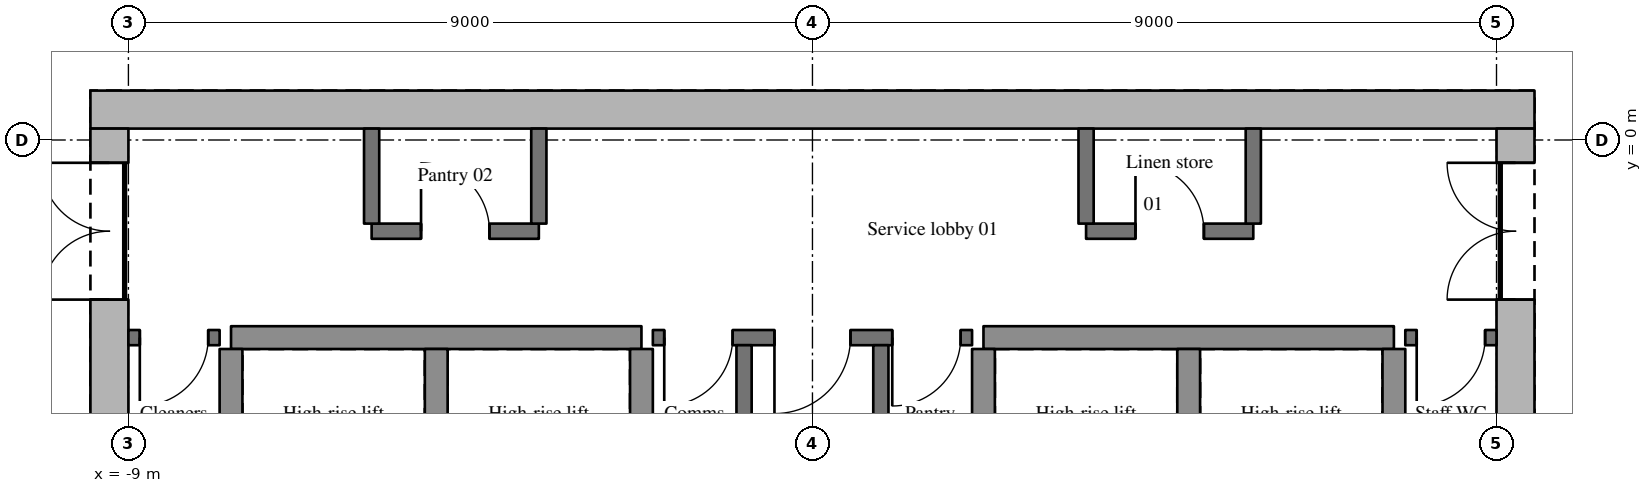
"""IFC4 building model, lengths in metres.
Left out: names, types, materials, properties, quantities, classifications, styles, units other than length and angle.
Written with IfcOpenShell. Run it as: python <this file> out.ifc"""

import sys

from ifc_helpers import new_model, si_unit, direction, frame, frame_2d, origin, place, context, subcontext, project, spatial, polyline, rectangle, outline, extrude, element, fill, save


model = new_model("IFC4")
c1 = context("Model", 3, precision=1e-05, world=origin(), true_north=direction((0.0, 1.0)))
c2 = subcontext(c1, "Body", "Model", "MODEL_VIEW")
j1 = project(units=[si_unit("LENGTHUNIT", "METRE"), si_unit("PLANEANGLEUNIT", "RADIAN")], contexts=[c1])
p1 = place(None, origin())
s1 = spatial("IfcSite", under=j1, at=p1, CompositionType="ELEMENT")
p2 = place(p1, origin())
s2 = spatial("IfcBuilding", under=s1, at=p2, CompositionType="ELEMENT")
p3 = place(p2, frame((0.0, 0.0, 297.3)))
s3 = spatial("IfcBuildingStorey", under=s2, at=p3, CompositionType="ELEMENT", Elevation=297.3)
p4 = place(p3, frame((-9.5, 0.4, 0.0), z_axis=(0.0, 0.0, 1.0), x_axis=(1.0, 0.0, 0.0)))
e1 = element("IfcWall", 1, at=p4, inside=s3, PredefinedType="SHEAR", context=c2, shape_type="SweptSolid", body=[
    extrude(outline(polyline([(0.0, 0.0), (19.0, 0.0), (19.0, 3.6), (0.0, 3.6), (0.0, 0.0)])), frame((0.0, 0.25, 0.0), z_axis=(0.0, -1.0, 0.0), x_axis=(1.0, 0.0, 0.0)), (0.0, 0.0, 1.0), 0.5),
])
p5 = place(p3, frame((-9.25, -11.5, 0.0), z_axis=(0.0, 0.0, 1.0), x_axis=(0.0, 1.0, 0.0)))
e2 = element("IfcWall", 2, at=p5, inside=s3, PredefinedType="SHEAR", context=c2, shape_type="SweptSolid", body=[
    extrude(outline(polyline([(0.0, 0.0), (11.65, 0.0), (11.65, 3.6), (0.0, 3.6), (0.0, 0.0)])), frame((0.0, 0.25, 0.0), z_axis=(0.0, -1.0, 0.0), x_axis=(1.0, 0.0, 0.0)), (0.0, 0.0, 1.0), 0.5),
])
p6 = place(p5, frame((9.4, 0.0, 0.0)))
e3 = element("IfcOpeningElement", 3, at=p6, cuts=e2, PredefinedType="OPENING", context=c2, shape_type="SweptSolid", body=[
    extrude(rectangle(XDim=1.8, YDim=2.1, at=frame_2d((0.9, 1.05))), frame((0.0, 0.26, 0.0), z_axis=(0.0, -1.0, 0.0), x_axis=(1.0, 0.0, 0.0)), (0.0, 0.0, 1.0), 0.52),
])
p7 = place(p3, frame((9.25, -11.5, 0.0), z_axis=(0.0, 0.0, 1.0), x_axis=(0.0, 1.0, 0.0)))
e4 = element("IfcWall", 4, at=p7, inside=s3, PredefinedType="SHEAR", context=c2, shape_type="SweptSolid", body=[
    extrude(outline(polyline([(0.0, 0.0), (11.65, 0.0), (11.65, 3.6), (0.0, 3.6), (0.0, 0.0)])), frame((0.0, 0.25, 0.0), z_axis=(0.0, -1.0, 0.0), x_axis=(1.0, 0.0, 0.0)), (0.0, 0.0, 1.0), 0.5),
])
p8 = place(p7, frame((9.4, 0.0, 0.0)))
e5 = element("IfcOpeningElement", 5, at=p8, cuts=e4, PredefinedType="OPENING", context=c2, shape_type="SweptSolid", body=[
    extrude(rectangle(XDim=1.8, YDim=2.1, at=frame_2d((0.9, 1.05))), frame((0.0, 0.26, 0.0), z_axis=(0.0, -1.0, 0.0), x_axis=(1.0, 0.0, 0.0)), (0.0, 0.0, 1.0), 0.52),
])
p9 = place(p3, frame((-7.8, -2.6, 0.0), z_axis=(0.0, 0.0, 1.0), x_axis=(-1.0, 0.0, 0.0)))
e6 = element("IfcWall", 6, at=p9, inside=s3, PredefinedType="SOLIDWALL", context=c2, shape_type="SweptSolid", body=[
    extrude(rectangle(XDim=1.2, YDim=0.2, at=frame_2d((0.6, 0.0))), origin(), (0.0, 0.0, 1.0), 3.3),
])
p10 = place(p9, frame((0.15, 0.0, 0.0)))
e7 = element("IfcOpeningElement", 7, at=p10, cuts=e6, PredefinedType="OPENING", context=c2, shape_type="SweptSolid", body=[
    extrude(rectangle(XDim=0.9, YDim=2.1, at=frame_2d((0.45, 1.05))), frame((0.0, 0.11, 0.0), z_axis=(0.0, -1.0, 0.0), x_axis=(1.0, 0.0, 0.0)), (0.0, 0.0, 1.0), 0.22),
])
p11 = place(p3, frame((-7.65, -2.6, 0.0), z_axis=(0.0, 0.0, 1.0), x_axis=(1.0, 0.0, 0.0)))
e8 = element("IfcWall", 8, at=p11, inside=s3, PredefinedType="SHEAR", context=c2, shape_type="SweptSolid", body=[
    extrude(rectangle(XDim=5.4, YDim=0.3, at=frame_2d((2.7, 0.0))), origin(), (0.0, 0.0, 1.0), 3.6),
])
p12 = place(p3, frame((2.1, -2.6, 0.0), z_axis=(0.0, 0.0, 1.0), x_axis=(-1.0, 0.0, 0.0)))
e9 = element("IfcWall", 9, at=p12, inside=s3, PredefinedType="SOLIDWALL", context=c2, shape_type="SweptSolid", body=[
    extrude(rectangle(XDim=4.2, YDim=0.2, at=frame_2d((2.1, 0.0))), origin(), (0.0, 0.0, 1.0), 3.3),
])
p13 = place(p12, frame((1.6, 0.0, 0.0)))
e10 = element("IfcOpeningElement", 10, at=p13, cuts=e9, PredefinedType="OPENING", context=c2, shape_type="SweptSolid", body=[
    extrude(rectangle(XDim=1.0, YDim=2.1, at=frame_2d((0.5, 1.05))), frame((0.0, 0.11, 0.0), z_axis=(0.0, -1.0, 0.0), x_axis=(1.0, 0.0, 0.0)), (0.0, 0.0, 1.0), 0.22),
])
p14 = place(p12, frame((3.15, 0.0, 0.0)))
e11 = element("IfcOpeningElement", 11, at=p14, cuts=e9, PredefinedType="OPENING", context=c2, shape_type="SweptSolid", body=[
    extrude(rectangle(XDim=0.9, YDim=2.1, at=frame_2d((0.45, 1.05))), frame((0.0, 0.11, 0.0), z_axis=(0.0, -1.0, 0.0), x_axis=(1.0, 0.0, 0.0)), (0.0, 0.0, 1.0), 0.22),
])
p15 = place(p12, frame((0.15, 0.0, 0.0)))
e12 = element("IfcOpeningElement", 12, at=p15, cuts=e9, PredefinedType="OPENING", context=c2, shape_type="SweptSolid", body=[
    extrude(rectangle(XDim=0.9, YDim=2.1, at=frame_2d((0.45, 1.05))), frame((0.0, 0.11, 0.0), z_axis=(0.0, -1.0, 0.0), x_axis=(1.0, 0.0, 0.0)), (0.0, 0.0, 1.0), 0.22),
])
p16 = place(p3, frame((2.25, -2.6, 0.0), z_axis=(0.0, 0.0, 1.0), x_axis=(1.0, 0.0, 0.0)))
e13 = element("IfcWall", 13, at=p16, inside=s3, PredefinedType="SHEAR", context=c2, shape_type="SweptSolid", body=[
    extrude(rectangle(XDim=5.4, YDim=0.3, at=frame_2d((2.7, 0.0))), origin(), (0.0, 0.0, 1.0), 3.6),
])
p17 = place(p3, frame((9.0, -2.6, 0.0), z_axis=(0.0, 0.0, 1.0), x_axis=(-1.0, 0.0, 0.0)))
e14 = element("IfcWall", 14, at=p17, inside=s3, PredefinedType="SOLIDWALL", context=c2, shape_type="SweptSolid", body=[
    extrude(rectangle(XDim=1.2, YDim=0.2, at=frame_2d((0.6, 0.0))), origin(), (0.0, 0.0, 1.0), 3.3),
])
p18 = place(p17, frame((0.15, 0.0, 0.0)))
e15 = element("IfcOpeningElement", 15, at=p18, cuts=e14, PredefinedType="OPENING", context=c2, shape_type="SweptSolid", body=[
    extrude(rectangle(XDim=0.9, YDim=2.1, at=frame_2d((0.45, 1.05))), frame((0.0, 0.11, 0.0), z_axis=(0.0, -1.0, 0.0), x_axis=(1.0, 0.0, 0.0)), (0.0, 0.0, 1.0), 0.22),
])
p19 = place(p3, frame((-5.8, -1.2, 0.0), z_axis=(0.0, 0.0, 1.0), x_axis=(1.0, 0.0, 0.0)))
e16 = element("IfcWall", 16, at=p19, inside=s3, PredefinedType="SOLIDWALL", context=c2, shape_type="SweptSolid", body=[
    extrude(rectangle(XDim=2.2, YDim=0.2, at=frame_2d((1.1, 0.0))), origin(), (0.0, 0.0, 1.0), 3.3),
])
p20 = place(p19, frame((0.65, 0.0, 0.0)))
e17 = element("IfcOpeningElement", 17, at=p20, cuts=e16, PredefinedType="OPENING", context=c2, shape_type="SweptSolid", body=[
    extrude(rectangle(XDim=0.9, YDim=2.1, at=frame_2d((0.45, 1.05))), frame((0.0, 0.11, 0.0), z_axis=(0.0, -1.0, 0.0), x_axis=(1.0, 0.0, 0.0)), (0.0, 0.0, 1.0), 0.22),
])
p21 = place(p3, frame((3.6, -1.2, 0.0), z_axis=(0.0, 0.0, 1.0), x_axis=(1.0, 0.0, 0.0)))
e18 = element("IfcWall", 18, at=p21, inside=s3, PredefinedType="SOLIDWALL", context=c2, shape_type="SweptSolid", body=[
    extrude(rectangle(XDim=2.2, YDim=0.2, at=frame_2d((1.1, 0.0))), origin(), (0.0, 0.0, 1.0), 3.3),
])
p22 = place(p21, frame((0.65, 0.0, 0.0)))
e19 = element("IfcOpeningElement", 19, at=p22, cuts=e18, PredefinedType="OPENING", context=c2, shape_type="SweptSolid", body=[
    extrude(rectangle(XDim=0.9, YDim=2.1, at=frame_2d((0.45, 1.05))), frame((0.0, 0.11, 0.0), z_axis=(0.0, -1.0, 0.0), x_axis=(1.0, 0.0, 0.0)), (0.0, 0.0, 1.0), 0.22),
])
p23 = place(p3, frame((-7.65, -4.8, 0.0), z_axis=(0.0, 0.0, 1.0), x_axis=(0.0, 1.0, 0.0)))
e20 = element("IfcWall", 20, at=p23, inside=s3, PredefinedType="SHEAR", context=c2, shape_type="SweptSolid", body=[
    extrude(rectangle(XDim=2.05, YDim=0.3, at=frame_2d((1.025, 0.0))), origin(), (0.0, 0.0, 1.0), 3.6),
])
p24 = place(p3, frame((-5.8, -1.1, 0.0), z_axis=(0.0, 0.0, 1.0), x_axis=(0.0, 1.0, 0.0)))
e21 = element("IfcWall", 21, at=p24, inside=s3, PredefinedType="SOLIDWALL", context=c2, shape_type="SweptSolid", body=[
    extrude(rectangle(XDim=1.25, YDim=0.2, at=frame_2d((0.625, 0.0))), origin(), (0.0, 0.0, 1.0), 3.3),
])
p25 = place(p3, frame((-4.95, -4.8, 0.0), z_axis=(0.0, 0.0, 1.0), x_axis=(0.0, 1.0, 0.0)))
e22 = element("IfcWall", 22, at=p25, inside=s3, PredefinedType="SHEAR", context=c2, shape_type="SweptSolid", body=[
    extrude(rectangle(XDim=2.05, YDim=0.3, at=frame_2d((1.025, 0.0))), origin(), (0.0, 0.0, 1.0), 3.6),
])
p26 = place(p3, frame((-3.6, -1.1, 0.0), z_axis=(0.0, 0.0, 1.0), x_axis=(0.0, 1.0, 0.0)))
e23 = element("IfcWall", 23, at=p26, inside=s3, PredefinedType="SOLIDWALL", context=c2, shape_type="SweptSolid", body=[
    extrude(rectangle(XDim=1.25, YDim=0.2, at=frame_2d((0.625, 0.0))), origin(), (0.0, 0.0, 1.0), 3.3),
])
p27 = place(p3, frame((-2.25, -4.8, 0.0), z_axis=(0.0, 0.0, 1.0), x_axis=(0.0, 1.0, 0.0)))
e24 = element("IfcWall", 24, at=p27, inside=s3, PredefinedType="SHEAR", context=c2, shape_type="SweptSolid", body=[
    extrude(rectangle(XDim=2.05, YDim=0.3, at=frame_2d((1.025, 0.0))), origin(), (0.0, 0.0, 1.0), 3.6),
])
for number, where, z_axis, x_axis in (
    (25, (-0.9, -4.85, 0.0), (0.0, 0.0, 1.0), (0.0, 1.0, 0.0)),
    (26, (0.9, -4.85, 0.0), (0.0, 0.0, 1.0), (0.0, 1.0, 0.0)),
):
    element("IfcWall", number, at=place(p3, frame(where, z_axis=z_axis, x_axis=x_axis)), inside=s3, PredefinedType="SOLIDWALL", context=c2, shape_type="SweptSolid", body=[
        extrude(rectangle(XDim=2.15, YDim=0.2, at=frame_2d((1.075, 0.0))), origin(), (0.0, 0.0, 1.0), 3.3),
    ])
p28 = place(p3, frame((2.25, -4.8, 0.0), z_axis=(0.0, 0.0, 1.0), x_axis=(0.0, 1.0, 0.0)))
e27 = element("IfcWall", 27, at=p28, inside=s3, PredefinedType="SHEAR", context=c2, shape_type="SweptSolid", body=[
    extrude(rectangle(XDim=2.05, YDim=0.3, at=frame_2d((1.025, 0.0))), origin(), (0.0, 0.0, 1.0), 3.6),
])
p29 = place(p3, frame((3.6, -1.1, 0.0), z_axis=(0.0, 0.0, 1.0), x_axis=(0.0, 1.0, 0.0)))
e28 = element("IfcWall", 28, at=p29, inside=s3, PredefinedType="SOLIDWALL", context=c2, shape_type="SweptSolid", body=[
    extrude(rectangle(XDim=1.25, YDim=0.2, at=frame_2d((0.625, 0.0))), origin(), (0.0, 0.0, 1.0), 3.3),
])
p30 = place(p3, frame((4.95, -4.8, 0.0), z_axis=(0.0, 0.0, 1.0), x_axis=(0.0, 1.0, 0.0)))
e29 = element("IfcWall", 29, at=p30, inside=s3, PredefinedType="SHEAR", context=c2, shape_type="SweptSolid", body=[
    extrude(rectangle(XDim=2.05, YDim=0.3, at=frame_2d((1.025, 0.0))), origin(), (0.0, 0.0, 1.0), 3.6),
])
p31 = place(p3, frame((5.8, -1.1, 0.0), z_axis=(0.0, 0.0, 1.0), x_axis=(0.0, 1.0, 0.0)))
e30 = element("IfcWall", 30, at=p31, inside=s3, PredefinedType="SOLIDWALL", context=c2, shape_type="SweptSolid", body=[
    extrude(rectangle(XDim=1.25, YDim=0.2, at=frame_2d((0.625, 0.0))), origin(), (0.0, 0.0, 1.0), 3.3),
])
p32 = place(p3, frame((7.65, -4.8, 0.0), z_axis=(0.0, 0.0, 1.0), x_axis=(0.0, 1.0, 0.0)))
e31 = element("IfcWall", 31, at=p32, inside=s3, PredefinedType="SHEAR", context=c2, shape_type="SweptSolid", body=[
    extrude(rectangle(XDim=2.05, YDim=0.3, at=frame_2d((1.025, 0.0))), origin(), (0.0, 0.0, 1.0), 3.6),
])
p33 = place(p6, origin())
e32 = element("IfcDoor", 32, at=p33, inside=s3, OperationType="DOUBLE_DOOR_SINGLE_SWING", PredefinedType="DOOR", context=c2, shape_type="SweptSolid", body=[
    extrude(rectangle(XDim=1.8, YDim=2.1, at=frame_2d((0.9, 1.05))), frame((0.0, 0.025, 0.0), z_axis=(0.0, -1.0, 0.0), x_axis=(1.0, 0.0, 0.0)), (0.0, 0.0, 1.0), 0.05),
])
fill(e3, e32)
p34 = place(p8, origin())
e33 = element("IfcDoor", 33, at=p34, inside=s3, OperationType="DOUBLE_DOOR_SINGLE_SWING", PredefinedType="DOOR", context=c2, shape_type="SweptSolid", body=[
    extrude(rectangle(XDim=1.8, YDim=2.1, at=frame_2d((0.9, 1.05))), frame((0.0, 0.025, 0.0), z_axis=(0.0, -1.0, 0.0), x_axis=(1.0, 0.0, 0.0)), (0.0, 0.0, 1.0), 0.05),
])
fill(e5, e33)
p35 = place(p13, origin())
e34 = element("IfcDoor", 34, at=p35, inside=s3, OperationType="SINGLE_SWING_RIGHT", PredefinedType="DOOR", context=c2, shape_type="SweptSolid", body=[
    extrude(rectangle(XDim=1.0, YDim=2.1, at=frame_2d((0.5, 1.05))), frame((0.0, 0.025, 0.0), z_axis=(0.0, -1.0, 0.0), x_axis=(1.0, 0.0, 0.0)), (0.0, 0.0, 1.0), 0.05),
])
fill(e10, e34)
p36 = place(p14, origin())
e35 = element("IfcDoor", 35, at=p36, inside=s3, OperationType="SINGLE_SWING_RIGHT", PredefinedType="DOOR", context=c2, shape_type="SweptSolid", body=[
    extrude(rectangle(XDim=0.9, YDim=2.1, at=frame_2d((0.45, 1.05))), frame((0.0, 0.025, 0.0), z_axis=(0.0, -1.0, 0.0), x_axis=(1.0, 0.0, 0.0)), (0.0, 0.0, 1.0), 0.05),
])
fill(e11, e35)
p37 = place(p15, origin())
e36 = element("IfcDoor", 36, at=p37, inside=s3, OperationType="SINGLE_SWING_RIGHT", PredefinedType="DOOR", context=c2, shape_type="SweptSolid", body=[
    extrude(rectangle(XDim=0.9, YDim=2.1, at=frame_2d((0.45, 1.05))), frame((0.0, 0.025, 0.0), z_axis=(0.0, -1.0, 0.0), x_axis=(1.0, 0.0, 0.0)), (0.0, 0.0, 1.0), 0.05),
])
fill(e12, e36)
p38 = place(p18, origin())
e37 = element("IfcDoor", 37, at=p38, inside=s3, OperationType="SINGLE_SWING_RIGHT", PredefinedType="DOOR", context=c2, shape_type="SweptSolid", body=[
    extrude(rectangle(XDim=0.9, YDim=2.1, at=frame_2d((0.45, 1.05))), frame((0.0, 0.025, 0.0), z_axis=(0.0, -1.0, 0.0), x_axis=(1.0, 0.0, 0.0)), (0.0, 0.0, 1.0), 0.05),
])
fill(e15, e37)
p39 = place(p10, origin())
e38 = element("IfcDoor", 38, at=p39, inside=s3, OperationType="SINGLE_SWING_RIGHT", PredefinedType="DOOR", context=c2, shape_type="SweptSolid", body=[
    extrude(rectangle(XDim=0.9, YDim=2.1, at=frame_2d((0.45, 1.05))), frame((0.0, 0.025, 0.0), z_axis=(0.0, -1.0, 0.0), x_axis=(1.0, 0.0, 0.0)), (0.0, 0.0, 1.0), 0.05),
])
fill(e7, e38)
p40 = place(p20, origin())
e39 = element("IfcDoor", 39, at=p40, inside=s3, OperationType="SINGLE_SWING_LEFT", PredefinedType="DOOR", context=c2, shape_type="SweptSolid", body=[
    extrude(rectangle(XDim=0.9, YDim=2.1, at=frame_2d((0.45, 1.05))), frame((0.0, 0.025, 0.0), z_axis=(0.0, -1.0, 0.0), x_axis=(1.0, 0.0, 0.0)), (0.0, 0.0, 1.0), 0.05),
])
fill(e17, e39)
p41 = place(p22, origin())
e40 = element("IfcDoor", 40, at=p41, inside=s3, OperationType="SINGLE_SWING_LEFT", PredefinedType="DOOR", context=c2, shape_type="SweptSolid", body=[
    extrude(rectangle(XDim=0.9, YDim=2.1, at=frame_2d((0.45, 1.05))), frame((0.0, 0.025, 0.0), z_axis=(0.0, -1.0, 0.0), x_axis=(1.0, 0.0, 0.0)), (0.0, 0.0, 1.0), 0.05),
])
fill(e19, e40)
save(model, sys.argv[1])
